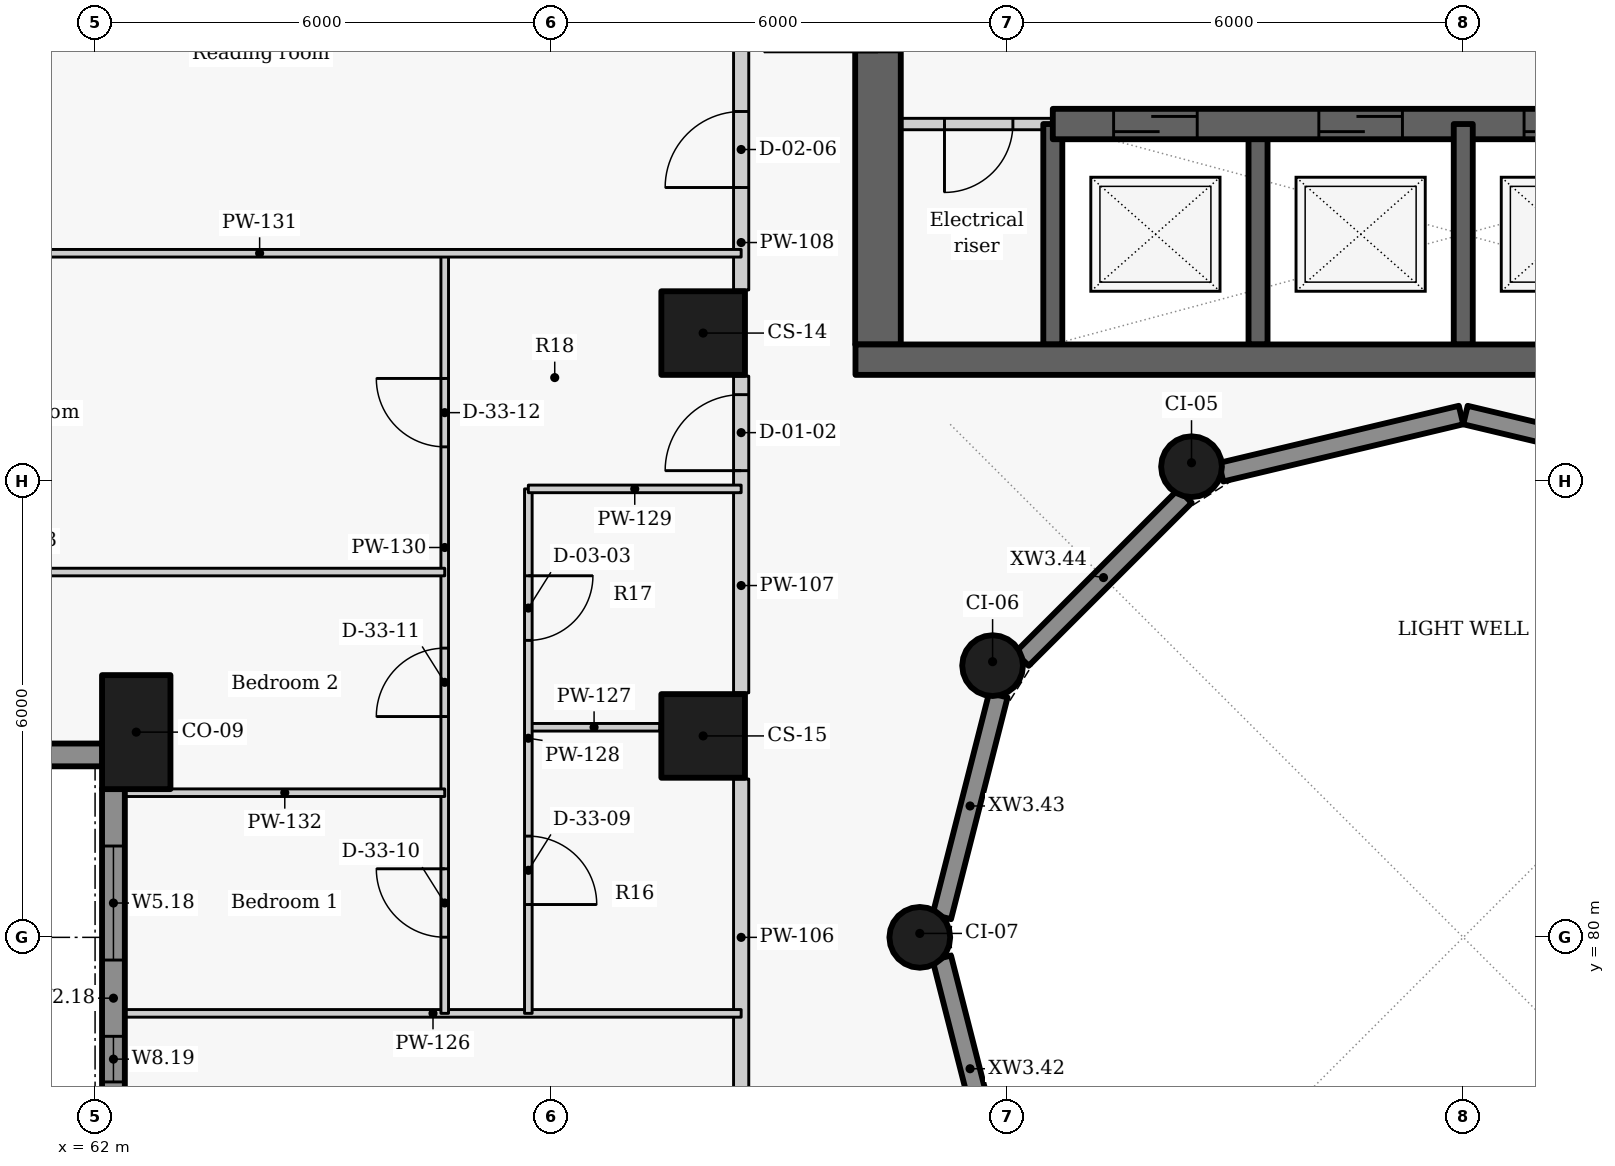
"""IFC4 building model, lengths in metres.
Left out: names, types, materials, properties, quantities, classifications, styles, units other than length and angle.
Written with IfcOpenShell. Run it as: python <this file> out.ifc"""

import sys

from ifc_helpers import new_model, si_unit, direction, frame, frame_2d, origin, origin_2d, place, context, subcontext, project, spatial, rectangle, circle, extrude, element, fill, save


model = new_model("IFC4")
c1 = context("Model", 3, precision=1e-05, world=origin(), true_north=direction((0.0, 1.0)))
c2 = subcontext(c1, "Body", "Model", "MODEL_VIEW")
j1 = project(units=[si_unit("LENGTHUNIT", "METRE"), si_unit("PLANEANGLEUNIT", "RADIAN")], contexts=[c1])
p1 = place(None, origin())
s1 = spatial("IfcSite", under=j1, at=p1, CompositionType="ELEMENT")
p2 = place(p1, origin())
s2 = spatial("IfcBuilding", under=s1, at=p2, CompositionType="ELEMENT")
p3 = place(p2, frame((0.0, 0.0, 67.8)))
s3 = spatial("IfcBuildingStorey", under=s2, at=p3, CompositionType="ELEMENT", Elevation=67.8)
p4 = place(p3, frame((62.542, 82.7, 0.0), z_axis=(0.0, 0.0, 1.0), x_axis=(0.0, -1.0, 0.0)))
e1 = element("IfcColumn", 1, at=p4, inside=s3, PredefinedType="COLUMN", context=c2, shape_type="SweptSolid", body=[
    extrude(rectangle(XDim=1.5, YDim=0.9, at=origin_2d()), origin(), (0.0, 0.0, 1.0), 3.3),
])
for number, where, z_axis, x_axis in (
    (2, (70.0, 87.95, 0.0), (0.0, 0.0, 1.0), (0.0, -1.0, 0.0)),
    (3, (70.0, 82.65, 0.0), (0.0, 0.0, 1.0), (0.0, -1.0, 0.0)),
):
    element("IfcColumn", number, at=place(p3, frame(where, z_axis=z_axis, x_axis=x_axis)), inside=s3, PredefinedType="COLUMN", context=c2, shape_type="SweptSolid", body=[
        extrude(rectangle(XDim=1.1, YDim=1.1, at=origin_2d()), origin(), (0.0, 0.0, 1.0), 3.3),
    ])
for number, where, z_axis, x_axis in (
    (4, (76.425, 86.192, 0.0), (0.0, 0.0, 1.0), (-0.866, -0.5, 0.0)),
    (5, (73.808, 83.575, 0.0), (0.0, 0.0, 1.0), (-0.5, -0.866, 0.0)),
    (6, (72.85, 80.0, 0.0), (0.0, 0.0, 1.0), (0.0, -1.0, 0.0)),
):
    element("IfcColumn", number, at=place(p3, frame(where, z_axis=z_axis, x_axis=x_axis)), inside=s3, PredefinedType="COLUMN", context=c2, shape_type="SweptSolid", body=[
        extrude(circle(Radius=0.4, at=origin_2d()), origin(), (0.0, 0.0, 1.0), 3.3),
    ])
p5 = place(p3, frame((57.923, 82.4, 0.0), z_axis=(0.0, 0.0, 1.0), x_axis=(1.0, 0.0, 0.0)))
e7 = element("IfcWall", 7, at=p5, inside=s3, PredefinedType="SOLIDWALL", context=c2, shape_type="SweptSolid", body=[
    extrude(rectangle(XDim=4.173, YDim=0.3, at=frame_2d((2.086, 0.0))), origin(), (0.0, 0.0, 1.0), 2.05),
])
p6 = place(p5, frame((1.336, 0.0, 0.9)))
e8 = element("IfcOpeningElement", 8, at=p6, cuts=e7, PredefinedType="OPENING", context=c2, shape_type="SweptSolid", body=[
    extrude(rectangle(XDim=1.5, YDim=1.1, at=frame_2d((0.75, 0.55))), frame((0.0, 0.16, 0.0), z_axis=(0.0, -1.0, 0.0), x_axis=(1.0, 0.0, 0.0)), (0.0, 0.0, 1.0), 0.32),
])
p7 = place(p3, frame((62.242, 81.954, 0.0), z_axis=(0.0, 0.0, 1.0), x_axis=(0.0, -1.0, 0.0)))
e9 = element("IfcWall", 9, at=p7, inside=s3, PredefinedType="SOLIDWALL", context=c2, shape_type="SweptSolid", body=[
    extrude(rectangle(XDim=4.208, YDim=0.3, at=frame_2d((2.104, 0.0))), origin(), (0.0, 0.0, 1.0), 2.05),
])
p8 = place(p7, frame((0.752, 0.0, 0.9)))
e10 = element("IfcOpeningElement", 10, at=p8, cuts=e9, PredefinedType="OPENING", context=c2, shape_type="SweptSolid", body=[
    extrude(rectangle(XDim=1.5, YDim=1.1, at=frame_2d((0.75, 0.55))), frame((0.0, 0.16, 0.0), z_axis=(0.0, -1.0, 0.0), x_axis=(1.0, 0.0, 0.0)), (0.0, 0.0, 1.0), 0.32),
])
p9 = place(p7, frame((3.256, 0.0, 0.9)))
e11 = element("IfcOpeningElement", 11, at=p9, cuts=e9, PredefinedType="OPENING", context=c2, shape_type="SweptSolid", body=[
    extrude(rectangle(XDim=0.6, YDim=1.1, at=frame_2d((0.3, 0.55))), frame((0.0, 0.16, 0.0), z_axis=(0.0, -1.0, 0.0), x_axis=(1.0, 0.0, 0.0)), (0.0, 0.0, 1.0), 0.32),
])
for number, where, z_axis, x_axis in (
    (12, (73.883, 76.813, 0.0), (0.0, 0.0, 1.0), (-0.247, 0.969, 0.0)),
    (13, (73.14, 80.27, 0.0), (0.0, 0.0, 1.0), (0.247, 0.969, 0.0)),
):
    element("IfcWall", number, at=place(p3, frame(where, z_axis=z_axis, x_axis=x_axis)), inside=s3, PredefinedType="SOLIDWALL", context=c2, shape_type="SweptSolid", body=[
        extrude(rectangle(XDim=3.01, YDim=0.25, at=frame_2d((1.505, 0.0))), origin(), (0.0, 0.0, 1.0), 2.05),
    ])
p10 = place(p3, frame((74.194, 83.661, 0.0), z_axis=(0.0, 0.0, 1.0), x_axis=(0.707106781187, 0.707106781187, 0.0)))
e14 = element("IfcWall", 14, at=p10, inside=s3, PredefinedType="SOLIDWALL", context=c2, shape_type="SweptSolid", body=[
    extrude(rectangle(XDim=3.033, YDim=0.25, at=frame_2d((1.517, 0.0))), origin(), (0.0, 0.0, 1.0), 2.05),
])
for number, where, z_axis, x_axis in (
    (15, (76.814, 86.119, 0.0), (0.0, 0.0, 1.0), (0.973, 0.232, 0.0)),
    (16, (80.029, 86.872, 0.0), (0.0, 0.0, 1.0), (0.973, -0.232, 0.0)),
):
    element("IfcWall", number, at=place(p3, frame(where, z_axis=z_axis, x_axis=x_axis)), inside=s3, PredefinedType="SOLIDWALL", context=c2, shape_type="SweptSolid", body=[
        extrude(rectangle(XDim=3.246, YDim=0.25, at=frame_2d((1.623, 0.0))), origin(), (0.0, 0.0, 1.0), 2.05),
    ])
p11 = place(p3, frame((74.6, 87.8, -0.275), z_axis=(0.0, 0.0, 1.0), x_axis=(0.0, 1.0, 0.0)))
e17 = element("IfcWall", 17, at=p11, inside=s3, PredefinedType="SHEAR", context=c2, shape_type="SweptSolid", body=[
    extrude(rectangle(XDim=2.9, YDim=0.25, at=frame_2d((1.45, 0.0))), origin(), (0.0, 0.0, 1.0), 3.225),
])
p12 = place(p3, frame((74.6, 90.7, 0.0), z_axis=(0.0, 0.0, 1.0), x_axis=(-1.0, 0.0, 0.0)))
e18 = element("IfcWall", 18, at=p12, inside=s3, PredefinedType="PARTITIONING", context=c2, shape_type="SweptSolid", body=[
    extrude(rectangle(XDim=2.6, YDim=0.15, at=frame_2d((1.3, 0.0))), origin(), (0.0, 0.0, 1.0), 2.95),
])
p13 = place(p12, frame((0.525, 0.0, 0.0)))
e19 = element("IfcOpeningElement", 19, at=p13, cuts=e18, PredefinedType="OPENING", context=c2, shape_type="SweptSolid", body=[
    extrude(rectangle(XDim=0.9, YDim=2.1, at=frame_2d((0.45, 1.05))), frame((0.0, 0.085, 0.0), z_axis=(0.0, -1.0, 0.0), x_axis=(1.0, 0.0, 0.0)), (0.0, 0.0, 1.0), 0.17),
])
p14 = place(p3, frame((72.3, 87.8, -0.275), z_axis=(0.0, 0.0, 1.0), x_axis=(0.0, 1.0, 0.0)))
e20 = element("IfcWall", 20, at=p14, inside=s3, PredefinedType="SHEAR", context=c2, shape_type="SweptSolid", body=[
    extrude(rectangle(XDim=9.1, YDim=0.6, at=frame_2d((4.55, 0.0))), origin(), (0.0, 0.0, 1.0), 3.225),
])
p15 = place(p14, frame((3.85, 0.0, 0.275)))
e21 = element("IfcOpeningElement", 21, at=p15, cuts=e20, PredefinedType="OPENING", context=c2, shape_type="SweptSolid", body=[
    extrude(rectangle(XDim=1.5, YDim=2.1, at=frame_2d((0.75, 1.05))), frame((0.0, 0.31, 0.0), z_axis=(0.0, -1.0, 0.0), x_axis=(1.0, 0.0, 0.0)), (0.0, 0.0, 1.0), 0.62),
])
p16 = place(p3, frame((77.3, 87.8, -0.275), z_axis=(0.0, 0.0, 1.0), x_axis=(0.0, 1.0, 0.0)))
e22 = element("IfcWall", 22, at=p16, inside=s3, PredefinedType="SHEAR", context=c2, shape_type="SweptSolid", body=[
    extrude(rectangle(XDim=2.9, YDim=0.25, at=frame_2d((1.45, 0.0))), origin(), (0.0, 0.0, 1.0), 3.225),
])
p17 = place(p3, frame((74.6, 90.7, -0.275), z_axis=(0.0, 0.0, 1.0), x_axis=(1.0, 0.0, 0.0)))
e23 = element("IfcWall", 23, at=p17, inside=s3, PredefinedType="SHEAR", context=c2, shape_type="SweptSolid", body=[
    extrude(rectangle(XDim=10.8, YDim=0.4, at=frame_2d((5.4, 0.0))), origin(), (0.0, 0.0, 1.0), 3.225),
])
p18 = place(p17, frame((0.8, 0.0, 0.275)))
e24 = element("IfcOpeningElement", 24, at=p18, cuts=e23, PredefinedType="OPENING", context=c2, shape_type="SweptSolid", body=[
    extrude(rectangle(XDim=1.1, YDim=2.1, at=frame_2d((0.55, 1.05))), frame((0.0, 0.21, 0.0), z_axis=(0.0, -1.0, 0.0), x_axis=(1.0, 0.0, 0.0)), (0.0, 0.0, 1.0), 0.42),
])
p19 = place(p17, frame((3.5, 0.0, 0.275)))
e25 = element("IfcOpeningElement", 25, at=p19, cuts=e23, PredefinedType="OPENING", context=c2, shape_type="SweptSolid", body=[
    extrude(rectangle(XDim=1.1, YDim=2.1, at=frame_2d((0.55, 1.05))), frame((0.0, 0.21, 0.0), z_axis=(0.0, -1.0, 0.0), x_axis=(1.0, 0.0, 0.0)), (0.0, 0.0, 1.0), 0.42),
])
p20 = place(p17, frame((6.2, 0.0, 0.275)))
e26 = element("IfcOpeningElement", 26, at=p20, cuts=e23, PredefinedType="OPENING", context=c2, shape_type="SweptSolid", body=[
    extrude(rectangle(XDim=1.1, YDim=2.1, at=frame_2d((0.55, 1.05))), frame((0.0, 0.21, 0.0), z_axis=(0.0, -1.0, 0.0), x_axis=(1.0, 0.0, 0.0)), (0.0, 0.0, 1.0), 0.42),
])
p21 = place(p3, frame((80.0, 87.8, -0.275), z_axis=(0.0, 0.0, 1.0), x_axis=(0.0, 1.0, 0.0)))
e27 = element("IfcWall", 27, at=p21, inside=s3, PredefinedType="SHEAR", context=c2, shape_type="SweptSolid", body=[
    extrude(rectangle(XDim=2.9, YDim=0.25, at=frame_2d((1.45, 0.0))), origin(), (0.0, 0.0, 1.0), 3.225),
])
p22 = place(p3, frame((70.5, 77.917, 0.0), z_axis=(0.0, 0.0, 1.0), x_axis=(0.0, 1.0, 0.0)))
e28 = element("IfcWall", 28, at=p22, inside=s3, PredefinedType="PARTITIONING", context=c2, shape_type="SweptSolid", body=[
    extrude(rectangle(XDim=4.166, YDim=0.2, at=frame_2d((2.083, 0.0))), origin(), (0.0, 0.0, 1.0), 2.95),
])
p23 = place(p3, frame((70.5, 83.217, 0.0), z_axis=(0.0, 0.0, 1.0), x_axis=(0.0, 1.0, 0.0)))
e29 = element("IfcWall", 29, at=p23, inside=s3, PredefinedType="PARTITIONING", context=c2, shape_type="SweptSolid", body=[
    extrude(rectangle(XDim=4.166, YDim=0.2, at=frame_2d((2.083, 0.0))), origin(), (0.0, 0.0, 1.0), 2.95),
])
p24 = place(p23, frame((2.923, 0.0, 0.0)))
e30 = element("IfcOpeningElement", 30, at=p24, cuts=e29, PredefinedType="OPENING", context=c2, shape_type="SweptSolid", body=[
    extrude(rectangle(XDim=1.0, YDim=2.1, at=frame_2d((0.5, 1.05))), frame((0.0, 0.11, 0.0), z_axis=(0.0, -1.0, 0.0), x_axis=(1.0, 0.0, 0.0)), (0.0, 0.0, 1.0), 0.22),
])
p25 = place(p3, frame((70.5, 88.517, 0.0), z_axis=(0.0, 0.0, 1.0), x_axis=(0.0, 1.0, 0.0)))
e31 = element("IfcWall", 31, at=p25, inside=s3, PredefinedType="PARTITIONING", context=c2, shape_type="SweptSolid", body=[
    extrude(rectangle(XDim=3.216, YDim=0.2, at=frame_2d((1.608, 0.0))), origin(), (0.0, 0.0, 1.0), 2.95),
])
p26 = place(p25, frame((1.348, 0.0, 0.0)))
e32 = element("IfcOpeningElement", 32, at=p26, cuts=e31, PredefinedType="OPENING", context=c2, shape_type="SweptSolid", body=[
    extrude(rectangle(XDim=1.0, YDim=2.1, at=frame_2d((0.5, 1.05))), frame((0.0, 0.11, 0.0), z_axis=(0.0, -1.0, 0.0), x_axis=(1.0, 0.0, 0.0)), (0.0, 0.0, 1.0), 0.22),
])
p27 = place(p3, frame((62.392, 79.0, 0.0), z_axis=(0.0, 0.0, 1.0), x_axis=(1.0, 0.0, 0.0)))
e33 = element("IfcWall", 33, at=p27, inside=s3, PredefinedType="PARTITIONING", context=c2, shape_type="SweptSolid", body=[
    extrude(rectangle(XDim=8.108, YDim=0.1, at=frame_2d((4.054, 0.0))), origin(), (0.0, 0.0, 1.0), 2.03),
])
p28 = place(p3, frame((67.7, 82.764, 0.0), z_axis=(0.0, 0.0, 1.0), x_axis=(1.0, 0.0, 0.0)))
e34 = element("IfcWall", 34, at=p28, inside=s3, PredefinedType="PARTITIONING", context=c2, shape_type="SweptSolid", body=[
    extrude(rectangle(XDim=1.73, YDim=0.1, at=frame_2d((0.865, 0.0))), origin(), (0.0, 0.0, 1.0), 2.95),
])
p29 = place(p3, frame((67.7, 85.9, 0.0), z_axis=(0.0, 0.0, 1.0), x_axis=(0.0, -1.0, 0.0)))
e35 = element("IfcWall", 35, at=p29, inside=s3, PredefinedType="PARTITIONING", context=c2, shape_type="SweptSolid", body=[
    extrude(rectangle(XDim=6.9, YDim=0.1, at=frame_2d((3.45, 0.0))), origin(), (0.0, 0.0, 1.0), 2.95),
])
p30 = place(p29, frame((4.568, 0.0, 0.0)))
e36 = element("IfcOpeningElement", 36, at=p30, cuts=e35, PredefinedType="OPENING", context=c2, shape_type="SweptSolid", body=[
    extrude(rectangle(XDim=0.9, YDim=2.1, at=frame_2d((0.45, 1.05))), frame((0.0, 0.06, 0.0), z_axis=(0.0, -1.0, 0.0), x_axis=(1.0, 0.0, 0.0)), (0.0, 0.0, 1.0), 0.12),
])
p31 = place(p29, frame((1.143, 0.0, 0.0)))
e37 = element("IfcOpeningElement", 37, at=p31, cuts=e35, PredefinedType="OPENING", context=c2, shape_type="SweptSolid", body=[
    extrude(rectangle(XDim=0.85, YDim=2.1, at=frame_2d((0.425, 1.05))), frame((0.0, 0.06, 0.0), z_axis=(0.0, -1.0, 0.0), x_axis=(1.0, 0.0, 0.0)), (0.0, 0.0, 1.0), 0.12),
])
p32 = place(p3, frame((67.7, 85.9, 0.0), z_axis=(0.0, 0.0, 1.0), x_axis=(1.0, 0.0, 0.0)))
e38 = element("IfcWall", 38, at=p32, inside=s3, PredefinedType="PARTITIONING", context=c2, shape_type="SweptSolid", body=[
    extrude(rectangle(XDim=2.8, YDim=0.1, at=frame_2d((1.4, 0.0))), origin(), (0.0, 0.0, 1.0), 2.43),
])
p33 = place(p3, frame((66.6, 79.0, 0.0), z_axis=(0.0, 0.0, 1.0), x_axis=(0.0, 1.0, 0.0)))
e39 = element("IfcWall", 39, at=p33, inside=s3, PredefinedType="PARTITIONING", context=c2, shape_type="SweptSolid", body=[
    extrude(rectangle(XDim=10.0, YDim=0.1, at=frame_2d((5.0, 0.0))), origin(), (0.0, 0.0, 1.0), 2.95),
])
p34 = place(p33, frame((1.002, 0.0, 0.0)))
e40 = element("IfcOpeningElement", 40, at=p34, cuts=e39, PredefinedType="OPENING", context=c2, shape_type="SweptSolid", body=[
    extrude(rectangle(XDim=0.9, YDim=2.1, at=frame_2d((0.45, 1.05))), frame((0.0, 0.06, 0.0), z_axis=(0.0, -1.0, 0.0), x_axis=(1.0, 0.0, 0.0)), (0.0, 0.0, 1.0), 0.12),
])
p35 = place(p33, frame((3.905, 0.0, 0.0)))
e41 = element("IfcOpeningElement", 41, at=p35, cuts=e39, PredefinedType="OPENING", context=c2, shape_type="SweptSolid", body=[
    extrude(rectangle(XDim=0.9, YDim=2.1, at=frame_2d((0.45, 1.05))), frame((0.0, 0.06, 0.0), z_axis=(0.0, -1.0, 0.0), x_axis=(1.0, 0.0, 0.0)), (0.0, 0.0, 1.0), 0.12),
])
p36 = place(p33, frame((7.453, 0.0, 0.0)))
e42 = element("IfcOpeningElement", 42, at=p36, cuts=e39, PredefinedType="OPENING", context=c2, shape_type="SweptSolid", body=[
    extrude(rectangle(XDim=0.9, YDim=2.1, at=frame_2d((0.45, 1.05))), frame((0.0, 0.06, 0.0), z_axis=(0.0, -1.0, 0.0), x_axis=(1.0, 0.0, 0.0)), (0.0, 0.0, 1.0), 0.12),
])
p37 = place(p3, frame((57.83, 89.0, 0.0), z_axis=(0.0, 0.0, 1.0), x_axis=(1.0, 0.0, 0.0)))
e43 = element("IfcWall", 43, at=p37, inside=s3, PredefinedType="PARTITIONING", context=c2, shape_type="SweptSolid", body=[
    extrude(rectangle(XDim=12.67, YDim=0.1, at=frame_2d((6.335, 0.0))), origin(), (0.0, 0.0, 1.0), 2.03),
])
p38 = place(p3, frame((62.392, 81.903, 0.0), z_axis=(0.0, 0.0, 1.0), x_axis=(1.0, 0.0, 0.0)))
e44 = element("IfcWall", 44, at=p38, inside=s3, PredefinedType="PARTITIONING", context=c2, shape_type="SweptSolid", body=[
    extrude(rectangle(XDim=4.208, YDim=0.1, at=frame_2d((2.104, 0.0))), origin(), (0.0, 0.0, 1.0), 2.03),
])
p39 = place(p3, frame((55.409, 84.806, 0.0), z_axis=(0.0, 0.0, 1.0), x_axis=(1.0, 0.0, 0.0)))
e45 = element("IfcWall", 45, at=p39, inside=s3, PredefinedType="PARTITIONING", context=c2, shape_type="SweptSolid", body=[
    extrude(rectangle(XDim=11.191, YDim=0.1, at=frame_2d((5.596, 0.0))), origin(), (0.0, 0.0, 1.0), 2.03),
])
p40 = place(p3, frame((72.004, 87.6, -0.275), z_axis=(0.0, 0.0, 1.0), x_axis=(1.0, 0.0, 0.0)))
e46 = element("IfcWall", 46, at=p40, inside=s3, PredefinedType="SHEAR", context=c2, shape_type="SweptSolid", body=[
    extrude(rectangle(XDim=15.992, YDim=0.4, at=frame_2d((7.996, 0.0))), origin(), (0.0, 0.0, 1.0), 3.225),
])
p41 = place(p8, origin())
e47 = element("IfcWindow", 47, at=p41, inside=s3, PartitioningType="SINGLE_PANEL", PredefinedType="WINDOW", context=c2, shape_type="SweptSolid", body=[
    extrude(rectangle(XDim=1.5, YDim=1.1, at=frame_2d((0.75, 0.55))), frame((0.0, 0.03, 0.0), z_axis=(0.0, -1.0, 0.0), x_axis=(1.0, 0.0, 0.0)), (0.0, 0.0, 1.0), 0.06),
])
fill(e10, e47)
p42 = place(p9, origin())
e48 = element("IfcWindow", 48, at=p42, inside=s3, PartitioningType="SINGLE_PANEL", PredefinedType="WINDOW", context=c2, shape_type="SweptSolid", body=[
    extrude(rectangle(XDim=0.6, YDim=1.1, at=frame_2d((0.3, 0.55))), frame((0.0, 0.03, 0.0), z_axis=(0.0, -1.0, 0.0), x_axis=(1.0, 0.0, 0.0)), (0.0, 0.0, 1.0), 0.06),
])
fill(e11, e48)
p43 = place(p13, origin())
e49 = element("IfcDoor", 49, at=p43, inside=s3, OperationType="SINGLE_SWING_RIGHT", PredefinedType="DOOR", context=c2, shape_type="SweptSolid", body=[
    extrude(rectangle(XDim=0.9, YDim=2.1, at=frame_2d((0.45, 1.05))), frame((0.0, 0.025, 0.0), z_axis=(0.0, -1.0, 0.0), x_axis=(1.0, 0.0, 0.0)), (0.0, 0.0, 1.0), 0.05),
])
fill(e19, e49)
p44 = place(p18, origin())
e50 = element("IfcDoor", 50, at=p44, inside=s3, OperationType="SLIDING_TO_LEFT", PredefinedType="DOOR", context=c2, shape_type="SweptSolid", body=[
    extrude(rectangle(XDim=1.1, YDim=2.1, at=frame_2d((0.55, 1.05))), frame((0.0, 0.025, 0.0), z_axis=(0.0, -1.0, 0.0), x_axis=(1.0, 0.0, 0.0)), (0.0, 0.0, 1.0), 0.05),
])
fill(e24, e50)
p45 = place(p19, origin())
e51 = element("IfcDoor", 51, at=p45, inside=s3, OperationType="SLIDING_TO_LEFT", PredefinedType="DOOR", context=c2, shape_type="SweptSolid", body=[
    extrude(rectangle(XDim=1.1, YDim=2.1, at=frame_2d((0.55, 1.05))), frame((0.0, 0.025, 0.0), z_axis=(0.0, -1.0, 0.0), x_axis=(1.0, 0.0, 0.0)), (0.0, 0.0, 1.0), 0.05),
])
fill(e25, e51)
p46 = place(p20, origin())
e52 = element("IfcDoor", 52, at=p46, inside=s3, OperationType="SLIDING_TO_LEFT", PredefinedType="DOOR", context=c2, shape_type="SweptSolid", body=[
    extrude(rectangle(XDim=1.1, YDim=2.1, at=frame_2d((0.55, 1.05))), frame((0.0, 0.025, 0.0), z_axis=(0.0, -1.0, 0.0), x_axis=(1.0, 0.0, 0.0)), (0.0, 0.0, 1.0), 0.05),
])
fill(e26, e52)
p47 = place(p24, origin())
e53 = element("IfcDoor", 53, at=p47, inside=s3, OperationType="SINGLE_SWING_LEFT", PredefinedType="DOOR", context=c2, shape_type="SweptSolid", body=[
    extrude(rectangle(XDim=1.0, YDim=2.1, at=frame_2d((0.5, 1.05))), frame((0.0, 0.025, 0.0), z_axis=(0.0, -1.0, 0.0), x_axis=(1.0, 0.0, 0.0)), (0.0, 0.0, 1.0), 0.05),
])
fill(e30, e53)
p48 = place(p30, origin())
e54 = element("IfcDoor", 54, at=p48, inside=s3, OperationType="SINGLE_SWING_RIGHT", PredefinedType="DOOR", context=c2, shape_type="SweptSolid", body=[
    extrude(rectangle(XDim=0.9, YDim=2.1, at=frame_2d((0.45, 1.05))), frame((0.0, 0.025, 0.0), z_axis=(0.0, -1.0, 0.0), x_axis=(1.0, 0.0, 0.0)), (0.0, 0.0, 1.0), 0.05),
])
fill(e36, e54)
p49 = place(p31, origin())
e55 = element("IfcDoor", 55, at=p49, inside=s3, OperationType="SINGLE_SWING_LEFT", PredefinedType="DOOR", context=c2, shape_type="SweptSolid", body=[
    extrude(rectangle(XDim=0.85, YDim=2.1, at=frame_2d((0.425, 1.05))), frame((0.0, 0.025, 0.0), z_axis=(0.0, -1.0, 0.0), x_axis=(1.0, 0.0, 0.0)), (0.0, 0.0, 1.0), 0.05),
])
fill(e37, e55)
p50 = place(p34, origin())
e56 = element("IfcDoor", 56, at=p50, inside=s3, OperationType="SINGLE_SWING_RIGHT", PredefinedType="DOOR", context=c2, shape_type="SweptSolid", body=[
    extrude(rectangle(XDim=0.9, YDim=2.1, at=frame_2d((0.45, 1.05))), frame((0.0, 0.025, 0.0), z_axis=(0.0, -1.0, 0.0), x_axis=(1.0, 0.0, 0.0)), (0.0, 0.0, 1.0), 0.05),
])
fill(e40, e56)
p51 = place(p35, origin())
e57 = element("IfcDoor", 57, at=p51, inside=s3, OperationType="SINGLE_SWING_LEFT", PredefinedType="DOOR", context=c2, shape_type="SweptSolid", body=[
    extrude(rectangle(XDim=0.9, YDim=2.1, at=frame_2d((0.45, 1.05))), frame((0.0, 0.025, 0.0), z_axis=(0.0, -1.0, 0.0), x_axis=(1.0, 0.0, 0.0)), (0.0, 0.0, 1.0), 0.05),
])
fill(e41, e57)
p52 = place(p36, origin())
e58 = element("IfcDoor", 58, at=p52, inside=s3, OperationType="SINGLE_SWING_RIGHT", PredefinedType="DOOR", context=c2, shape_type="SweptSolid", body=[
    extrude(rectangle(XDim=0.9, YDim=2.1, at=frame_2d((0.45, 1.05))), frame((0.0, 0.025, 0.0), z_axis=(0.0, -1.0, 0.0), x_axis=(1.0, 0.0, 0.0)), (0.0, 0.0, 1.0), 0.05),
])
fill(e42, e58)
p53 = place(p26, origin())
e59 = element("IfcDoor", 59, at=p53, inside=s3, OperationType="SINGLE_SWING_LEFT", PredefinedType="DOOR", context=c2, shape_type="SweptSolid", body=[
    extrude(rectangle(XDim=1.0, YDim=2.1, at=frame_2d((0.5, 1.05))), frame((0.0, 0.025, 0.0), z_axis=(0.0, -1.0, 0.0), x_axis=(1.0, 0.0, 0.0)), (0.0, 0.0, 1.0), 0.05),
])
fill(e32, e59)
save(model, sys.argv[1])
